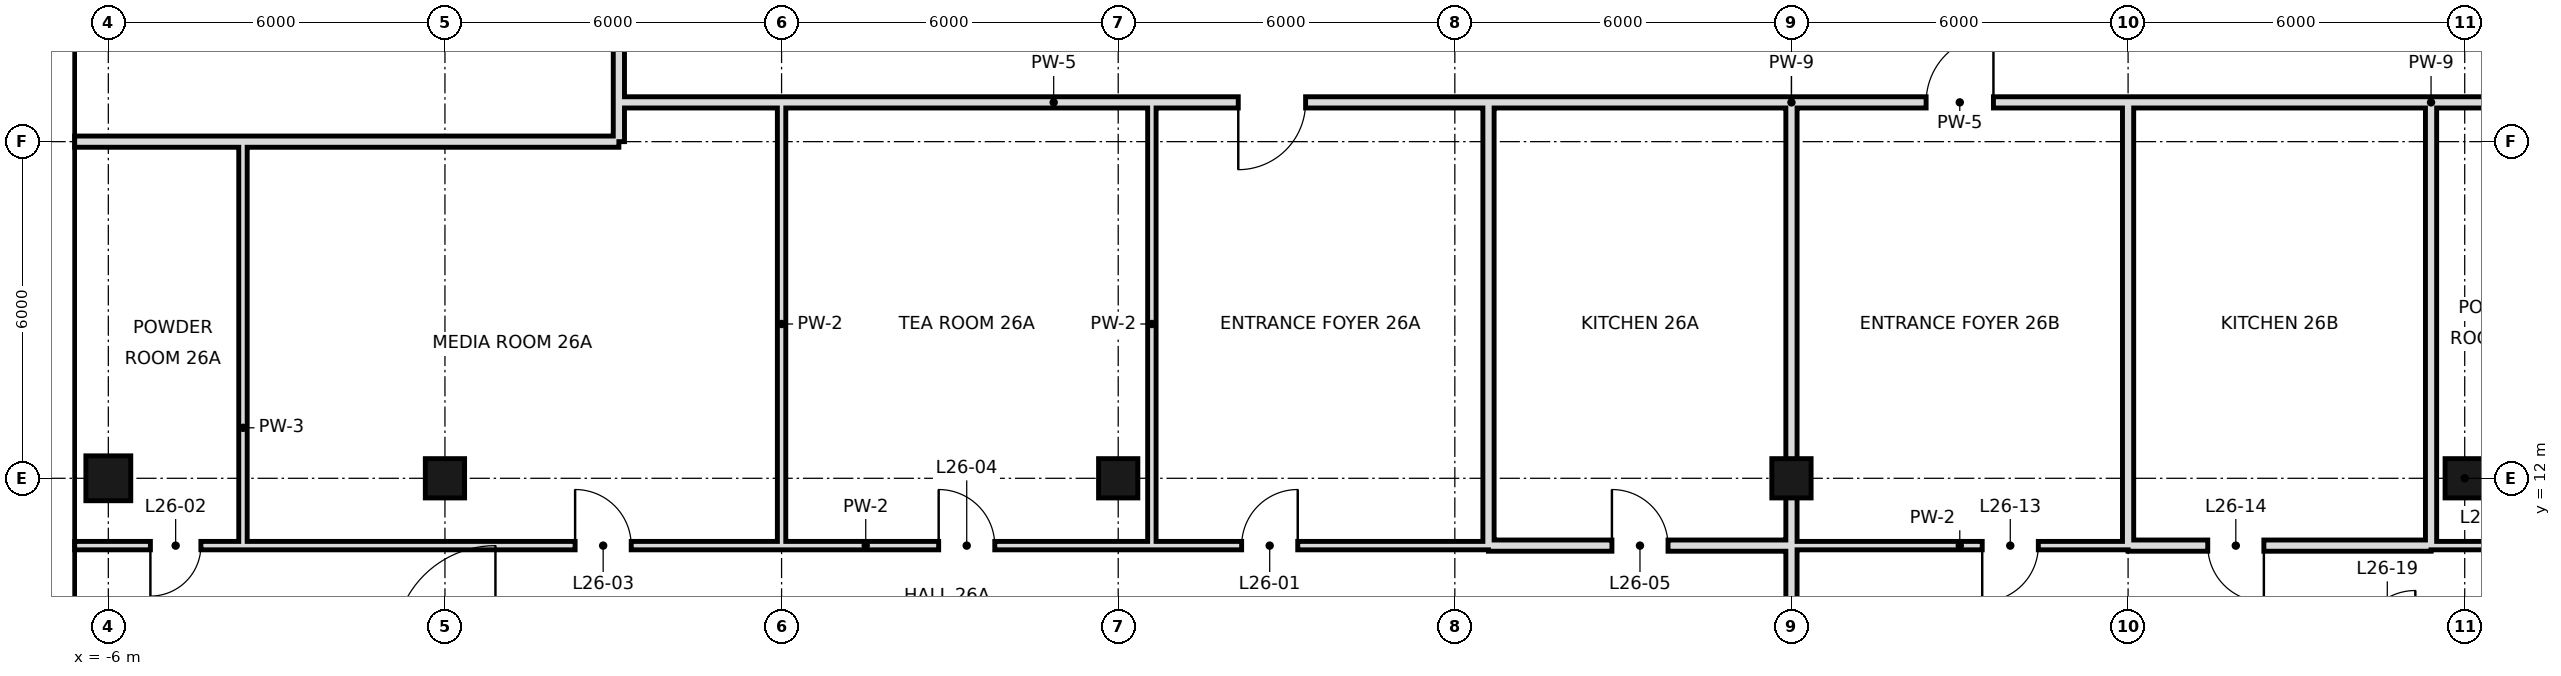
"""IFC4 building model, lengths in metres.
Left out: names, types, materials, properties, quantities, classifications, styles, units other than length and angle.
Written with IfcOpenShell. Run it as: python <this file> out.ifc"""

import sys

from ifc_helpers import new_model, si_unit, direction, frame, frame_2d, origin, origin_2d, place, context, subcontext, project, spatial, rectangle, hollow_rectangle, extrude, element, fill, save


model = new_model("IFC4")
c1 = context("Model", 3, precision=1e-05, world=origin(), true_north=direction((0.0, 1.0)))
c2 = subcontext(c1, "Body", "Model", "MODEL_VIEW")
j1 = project(units=[si_unit("LENGTHUNIT", "METRE"), si_unit("PLANEANGLEUNIT", "RADIAN")], contexts=[c1])
p1 = place(None, origin())
s1 = spatial("IfcSite", under=j1, at=p1, CompositionType="ELEMENT")
p2 = place(p1, origin())
s2 = spatial("IfcBuilding", under=s1, at=p2, CompositionType="ELEMENT")
p3 = place(p2, frame((0.0, 0.0, 119.6)))
s3 = spatial("IfcBuildingStorey", under=s2, at=p3, CompositionType="ELEMENT", Elevation=119.6)
p4 = place(p3, frame((-6.0, 12.0, 0.0), z_axis=(0.0, 0.0, 1.0), x_axis=(1.0, 0.0, 0.0)))
e1 = element("IfcColumn", 1, at=p4, inside=s3, PredefinedType="COLUMN", context=c2, shape_type="SweptSolid", body=[
    extrude(hollow_rectangle(XDim=0.8, YDim=0.8, WallThickness=0.04, at=origin_2d()), origin(), (0.0, 0.0, 1.0), 3.6),
])
for number, where, z_axis, x_axis in (
    (2, (0.0, 12.0, 0.0), (0.0, 0.0, 1.0), (1.0, 0.0, 0.0)),
    (3, (12.0, 12.0, 0.0), (0.0, 0.0, 1.0), (1.0, 0.0, 0.0)),
    (4, (24.0, 12.0, 0.0), (0.0, 0.0, 1.0), (1.0, 0.0, 0.0)),
    (5, (36.0, 12.0, 0.0), (0.0, 0.0, 1.0), (1.0, 0.0, 0.0)),
):
    element("IfcColumn", number, at=place(p3, frame(where, z_axis=z_axis, x_axis=x_axis)), inside=s3, PredefinedType="COLUMN", context=c2, shape_type="SweptSolid", body=[
        extrude(hollow_rectangle(XDim=0.7, YDim=0.7, WallThickness=0.036, at=origin_2d()), origin(), (0.0, 0.0, 1.0), 3.6),
    ])
p5 = place(p3, frame((-3.6, 10.8, 0.0), z_axis=(0.0, 0.0, 1.0), x_axis=(0.0, 1.0, 0.0)))
e6 = element("IfcWall", 6, at=p5, inside=s3, PredefinedType="PARTITIONING", context=c2, shape_type="SweptSolid", body=[
    extrude(rectangle(XDim=7.2, YDim=0.15, at=frame_2d((3.6, 0.0))), origin(), (0.0, 0.0, 1.0), 3.42),
])
p6 = place(p3, frame((12.6, 10.8, 0.0), z_axis=(0.0, 0.0, 1.0), x_axis=(0.0, 1.0, 0.0)))
e7 = element("IfcWall", 7, at=p6, inside=s3, PredefinedType="PARTITIONING", context=c2, shape_type="SweptSolid", body=[
    extrude(rectangle(XDim=7.9, YDim=0.15, at=frame_2d((3.95, 0.0))), origin(), (0.0, 0.0, 1.0), 3.42),
])
for number, where, z_axis, x_axis in (
    (8, (18.6, 10.8, 0.0), (0.0, 0.0, 1.0), (0.0, 1.0, 0.0)),
    (9, (24.0, 10.8, 0.0), (0.0, 0.0, 1.0), (0.0, 1.0, 0.0)),
):
    element("IfcWall", number, at=place(p3, frame(where, z_axis=z_axis, x_axis=x_axis)), inside=s3, PredefinedType="SOLIDWALL", context=c2, shape_type="SweptSolid", body=[
        extrude(rectangle(XDim=7.9, YDim=0.2, at=frame_2d((3.95, 0.0))), origin(), (0.0, 0.0, 1.0), 2.72),
    ])
p7 = place(p3, frame((24.0, 0.0, 0.0), z_axis=(0.0, 0.0, 1.0), x_axis=(0.0, 1.0, 0.0)))
e10 = element("IfcWall", 10, at=p7, inside=s3, PredefinedType="SOLIDWALL", context=c2, shape_type="SweptSolid", body=[
    extrude(rectangle(XDim=10.8, YDim=0.2, at=frame_2d((5.4, 0.0))), origin(), (0.0, 0.0, 1.0), 2.72),
])
p8 = place(p3, frame((3.1, 18.0, 0.0), z_axis=(0.0, 0.0, 1.0), x_axis=(0.0, 1.0, 0.0)))
e11 = element("IfcWall", 11, at=p8, inside=s3, PredefinedType="SOLIDWALL", context=c2, shape_type="SweptSolid", body=[
    extrude(rectangle(XDim=30.6, YDim=0.2, at=frame_2d((15.3, 0.0))), origin(), (0.0, 0.0, 1.0), 2.72),
])
p9 = place(p8, frame((14.75, 0.0, 0.0)))
e12 = element("IfcOpeningElement", 12, at=p9, cuts=e11, PredefinedType="OPENING", context=c2, shape_type="SweptSolid", body=[
    extrude(rectangle(XDim=1.2, YDim=2.4, at=frame_2d((0.6, 1.2))), frame((0.0, 0.11, 0.0), z_axis=(0.0, -1.0, 0.0), x_axis=(1.0, 0.0, 0.0)), (0.0, 0.0, 1.0), 0.22),
])
for number, where, z_axis, x_axis in (
    (13, (30.0, 10.8, 0.0), (0.0, 0.0, 1.0), (0.0, 1.0, 0.0)),
    (14, (35.4, 10.8, 0.0), (0.0, 0.0, 1.0), (0.0, 1.0, 0.0)),
):
    element("IfcWall", number, at=place(p3, frame(where, z_axis=z_axis, x_axis=x_axis)), inside=s3, PredefinedType="SOLIDWALL", context=c2, shape_type="SweptSolid", body=[
        extrude(rectangle(XDim=7.9, YDim=0.2, at=frame_2d((3.95, 0.0))), origin(), (0.0, 0.0, 1.0), 2.72),
    ])
p10 = place(p3, frame((6.0, 10.8, 0.0), z_axis=(0.0, 0.0, 1.0), x_axis=(0.0, 1.0, 0.0)))
e15 = element("IfcWall", 15, at=p10, inside=s3, PredefinedType="PARTITIONING", context=c2, shape_type="SweptSolid", body=[
    extrude(rectangle(XDim=7.9, YDim=0.15, at=frame_2d((3.95, 0.0))), origin(), (0.0, 0.0, 1.0), 2.72),
])
p11 = place(p3, frame((18.6, 10.8, 0.0), z_axis=(0.0, 0.0, 1.0), x_axis=(1.0, 0.0, 0.0)))
e16 = element("IfcWall", 16, at=p11, inside=s3, PredefinedType="SOLIDWALL", context=c2, shape_type="SweptSolid", body=[
    extrude(rectangle(XDim=5.4, YDim=0.2, at=frame_2d((2.7, 0.0))), origin(), (0.0, 0.0, 1.0), 2.72),
])
p12 = place(p11, frame((2.2, 0.0, 0.0)))
e17 = element("IfcOpeningElement", 17, at=p12, cuts=e16, PredefinedType="OPENING", context=c2, shape_type="SweptSolid", body=[
    extrude(rectangle(XDim=1.0, YDim=2.4, at=frame_2d((0.5, 1.2))), frame((0.0, 0.11, 0.0), z_axis=(0.0, -1.0, 0.0), x_axis=(1.0, 0.0, 0.0)), (0.0, 0.0, 1.0), 0.22),
])
p13 = place(p3, frame((30.0, 10.8, 0.0), z_axis=(0.0, 0.0, 1.0), x_axis=(1.0, 0.0, 0.0)))
e18 = element("IfcWall", 18, at=p13, inside=s3, PredefinedType="SOLIDWALL", context=c2, shape_type="SweptSolid", body=[
    extrude(rectangle(XDim=5.4, YDim=0.2, at=frame_2d((2.7, 0.0))), origin(), (0.0, 0.0, 1.0), 2.72),
])
p14 = place(p13, frame((1.42, 0.0, 0.0)))
e19 = element("IfcOpeningElement", 19, at=p14, cuts=e18, PredefinedType="OPENING", context=c2, shape_type="SweptSolid", body=[
    extrude(rectangle(XDim=1.0, YDim=2.4, at=frame_2d((0.5, 1.2))), frame((0.0, 0.11, 0.0), z_axis=(0.0, -1.0, 0.0), x_axis=(1.0, 0.0, 0.0)), (0.0, 0.0, 1.0), 0.22),
])
p15 = place(p3, frame((-3.6, 10.8, 0.0), z_axis=(0.0, 0.0, 1.0), x_axis=(1.0, 0.0, 0.0)))
e20 = element("IfcWall", 20, at=p15, inside=s3, PredefinedType="PARTITIONING", context=c2, shape_type="SweptSolid", body=[
    extrude(rectangle(XDim=22.2, YDim=0.15, at=frame_2d((11.1, 0.0))), origin(), (0.0, 0.0, 1.0), 3.42),
])
p16 = place(p15, frame((17.8, 0.0, 0.0)))
e21 = element("IfcOpeningElement", 21, at=p16, cuts=e20, PredefinedType="OPENING", context=c2, shape_type="SweptSolid", body=[
    extrude(rectangle(XDim=1.0, YDim=2.4, at=frame_2d((0.5, 1.2))), frame((0.0, 0.085, 0.0), z_axis=(0.0, -1.0, 0.0), x_axis=(1.0, 0.0, 0.0)), (0.0, 0.0, 1.0), 0.17),
])
p17 = place(p15, frame((5.92, 0.0, 0.0)))
e22 = element("IfcOpeningElement", 22, at=p17, cuts=e20, PredefinedType="OPENING", context=c2, shape_type="SweptSolid", body=[
    extrude(rectangle(XDim=1.0, YDim=2.4, at=frame_2d((0.5, 1.2))), frame((0.0, 0.085, 0.0), z_axis=(0.0, -1.0, 0.0), x_axis=(1.0, 0.0, 0.0)), (0.0, 0.0, 1.0), 0.17),
])
p18 = place(p15, frame((12.4, 0.0, 0.0)))
e23 = element("IfcOpeningElement", 23, at=p18, cuts=e20, PredefinedType="OPENING", context=c2, shape_type="SweptSolid", body=[
    extrude(rectangle(XDim=1.0, YDim=2.4, at=frame_2d((0.5, 1.2))), frame((0.0, 0.085, 0.0), z_axis=(0.0, -1.0, 0.0), x_axis=(1.0, 0.0, 0.0)), (0.0, 0.0, 1.0), 0.17),
])
p19 = place(p3, frame((24.0, 10.8, 0.0), z_axis=(0.0, 0.0, 1.0), x_axis=(1.0, 0.0, 0.0)))
e24 = element("IfcWall", 24, at=p19, inside=s3, PredefinedType="PARTITIONING", context=c2, shape_type="SweptSolid", body=[
    extrude(rectangle(XDim=6.0, YDim=0.15, at=frame_2d((3.0, 0.0))), origin(), (0.0, 0.0, 1.0), 3.42),
])
p20 = place(p19, frame((3.4, 0.0, 0.0)))
e25 = element("IfcOpeningElement", 25, at=p20, cuts=e24, PredefinedType="OPENING", context=c2, shape_type="SweptSolid", body=[
    extrude(rectangle(XDim=1.0, YDim=2.4, at=frame_2d((0.5, 1.2))), frame((0.0, 0.085, 0.0), z_axis=(0.0, -1.0, 0.0), x_axis=(1.0, 0.0, 0.0)), (0.0, 0.0, 1.0), 0.17),
])
p21 = place(p3, frame((-6.6, 10.8, 0.0), z_axis=(0.0, 0.0, 1.0), x_axis=(1.0, 0.0, 0.0)))
e26 = element("IfcWall", 26, at=p21, inside=s3, PredefinedType="PARTITIONING", context=c2, shape_type="SweptSolid", body=[
    extrude(rectangle(XDim=3.0, YDim=0.15, at=frame_2d((1.5, 0.0))), origin(), (0.0, 0.0, 1.0), 3.42),
])
p22 = place(p21, frame((1.35, 0.0, 0.0)))
e27 = element("IfcOpeningElement", 27, at=p22, cuts=e26, PredefinedType="OPENING", context=c2, shape_type="SweptSolid", body=[
    extrude(rectangle(XDim=0.9, YDim=2.4, at=frame_2d((0.45, 1.2))), frame((0.0, 0.085, 0.0), z_axis=(0.0, -1.0, 0.0), x_axis=(1.0, 0.0, 0.0)), (0.0, 0.0, 1.0), 0.17),
])
p23 = place(p3, frame((35.4, 10.8, 0.0), z_axis=(0.0, 0.0, 1.0), x_axis=(1.0, 0.0, 0.0)))
e28 = element("IfcWall", 28, at=p23, inside=s3, PredefinedType="PARTITIONING", context=c2, shape_type="SweptSolid", body=[
    extrude(rectangle(XDim=2.4, YDim=0.15, at=frame_2d((1.2, 0.0))), origin(), (0.0, 0.0, 1.0), 3.42),
])
p24 = place(p23, frame((1.1, 0.0, 0.0)))
e29 = element("IfcOpeningElement", 29, at=p24, cuts=e28, PredefinedType="OPENING", context=c2, shape_type="SweptSolid", body=[
    extrude(rectangle(XDim=0.9, YDim=2.4, at=frame_2d((0.45, 1.2))), frame((0.0, 0.085, 0.0), z_axis=(0.0, -1.0, 0.0), x_axis=(1.0, 0.0, 0.0)), (0.0, 0.0, 1.0), 0.17),
])
p25 = place(p3, frame((-6.6, 18.0, 0.0), z_axis=(0.0, 0.0, 1.0), x_axis=(1.0, 0.0, 0.0)))
e30 = element("IfcWall", 30, at=p25, inside=s3, PredefinedType="SOLIDWALL", context=c2, shape_type="SweptSolid", body=[
    extrude(rectangle(XDim=9.7, YDim=0.2, at=frame_2d((4.85, 0.0))), origin(), (0.0, 0.0, 1.0), 2.72),
])
p26 = place(p3, frame((3.1, 18.7, 0.0), z_axis=(0.0, 0.0, 1.0), x_axis=(1.0, 0.0, 0.0)))
e31 = element("IfcWall", 31, at=p26, inside=s3, PredefinedType="SOLIDWALL", context=c2, shape_type="SweptSolid", body=[
    extrude(rectangle(XDim=15.5, YDim=0.2, at=frame_2d((7.75, 0.0))), origin(), (0.0, 0.0, 1.0), 2.72),
])
p27 = place(p26, frame((11.04, 0.0, 0.0)))
e32 = element("IfcOpeningElement", 32, at=p27, cuts=e31, PredefinedType="OPENING", context=c2, shape_type="SweptSolid", body=[
    extrude(rectangle(XDim=1.2, YDim=2.4, at=frame_2d((0.6, 1.2))), frame((0.0, 0.11, 0.0), z_axis=(0.0, -1.0, 0.0), x_axis=(1.0, 0.0, 0.0)), (0.0, 0.0, 1.0), 0.22),
])
p28 = place(p3, frame((24.0, 18.7, 0.0), z_axis=(0.0, 0.0, 1.0), x_axis=(1.0, 0.0, 0.0)))
e33 = element("IfcWall", 33, at=p28, inside=s3, PredefinedType="SOLIDWALL", context=c2, shape_type="SweptSolid", body=[
    extrude(rectangle(XDim=6.0, YDim=0.2, at=frame_2d((3.0, 0.0))), origin(), (0.0, 0.0, 1.0), 2.72),
])
p29 = place(p28, frame((2.4, 0.0, 0.0)))
e34 = element("IfcOpeningElement", 34, at=p29, cuts=e33, PredefinedType="OPENING", context=c2, shape_type="SweptSolid", body=[
    extrude(rectangle(XDim=1.2, YDim=2.4, at=frame_2d((0.6, 1.2))), frame((0.0, 0.11, 0.0), z_axis=(0.0, -1.0, 0.0), x_axis=(1.0, 0.0, 0.0)), (0.0, 0.0, 1.0), 0.22),
])
p30 = place(p3, frame((35.4, 18.7, 0.0), z_axis=(0.0, 0.0, 1.0), x_axis=(1.0, 0.0, 0.0)))
e35 = element("IfcWall", 35, at=p30, inside=s3, PredefinedType="SOLIDWALL", context=c2, shape_type="SweptSolid", body=[
    extrude(rectangle(XDim=9.5, YDim=0.2, at=frame_2d((4.75, 0.0))), origin(), (0.0, 0.0, 1.0), 2.72),
])
p31 = place(p3, frame((18.6, 18.7, 0.0), z_axis=(0.0, 0.0, 1.0), x_axis=(1.0, 0.0, 0.0)))
e36 = element("IfcWall", 36, at=p31, inside=s3, PredefinedType="SOLIDWALL", context=c2, shape_type="SweptSolid", body=[
    extrude(rectangle(XDim=5.4, YDim=0.2, at=frame_2d((2.7, 0.0))), origin(), (0.0, 0.0, 1.0), 3.42),
])
p32 = place(p3, frame((30.0, 18.7, 0.0), z_axis=(0.0, 0.0, 1.0), x_axis=(1.0, 0.0, 0.0)))
e37 = element("IfcWall", 37, at=p32, inside=s3, PredefinedType="SOLIDWALL", context=c2, shape_type="SweptSolid", body=[
    extrude(rectangle(XDim=5.4, YDim=0.2, at=frame_2d((2.7, 0.0))), origin(), (0.0, 0.0, 1.0), 2.72),
])
p33 = place(p16, frame((1.0, 0.0, 0.0), z_axis=(0.0, 0.0, 1.0), x_axis=(-1.0, 0.0, 0.0)))
e38 = element("IfcDoor", 38, at=p33, inside=s3, OperationType="SINGLE_SWING_LEFT", PredefinedType="DOOR", context=c2, shape_type="SweptSolid", body=[
    extrude(rectangle(XDim=1.0, YDim=2.4, at=frame_2d((0.5, 1.2))), frame((0.0, 0.025, 0.0), z_axis=(0.0, -1.0, 0.0), x_axis=(1.0, 0.0, 0.0)), (0.0, 0.0, 1.0), 0.05),
])
fill(e21, e38)
p34 = place(p22, frame((0.9, 0.0, 0.0), z_axis=(0.0, 0.0, 1.0), x_axis=(-1.0, 0.0, 0.0)))
e39 = element("IfcDoor", 39, at=p34, inside=s3, OperationType="SINGLE_SWING_RIGHT", PredefinedType="DOOR", context=c2, shape_type="SweptSolid", body=[
    extrude(rectangle(XDim=0.9, YDim=2.4, at=frame_2d((0.45, 1.2))), frame((0.0, 0.025, 0.0), z_axis=(0.0, -1.0, 0.0), x_axis=(1.0, 0.0, 0.0)), (0.0, 0.0, 1.0), 0.05),
])
fill(e27, e39)
p35 = place(p17, origin())
e40 = element("IfcDoor", 40, at=p35, inside=s3, OperationType="SINGLE_SWING_LEFT", PredefinedType="DOOR", context=c2, shape_type="SweptSolid", body=[
    extrude(rectangle(XDim=1.0, YDim=2.4, at=frame_2d((0.5, 1.2))), frame((0.0, 0.025, 0.0), z_axis=(0.0, -1.0, 0.0), x_axis=(1.0, 0.0, 0.0)), (0.0, 0.0, 1.0), 0.05),
])
fill(e22, e40)
p36 = place(p18, origin())
e41 = element("IfcDoor", 41, at=p36, inside=s3, OperationType="SINGLE_SWING_LEFT", PredefinedType="DOOR", context=c2, shape_type="SweptSolid", body=[
    extrude(rectangle(XDim=1.0, YDim=2.4, at=frame_2d((0.5, 1.2))), frame((0.0, 0.025, 0.0), z_axis=(0.0, -1.0, 0.0), x_axis=(1.0, 0.0, 0.0)), (0.0, 0.0, 1.0), 0.05),
])
fill(e23, e41)
p37 = place(p12, origin())
e42 = element("IfcDoor", 42, at=p37, inside=s3, OperationType="SINGLE_SWING_LEFT", PredefinedType="DOOR", context=c2, shape_type="SweptSolid", body=[
    extrude(rectangle(XDim=1.0, YDim=2.4, at=frame_2d((0.5, 1.2))), frame((0.0, 0.025, 0.0), z_axis=(0.0, -1.0, 0.0), x_axis=(1.0, 0.0, 0.0)), (0.0, 0.0, 1.0), 0.05),
])
fill(e17, e42)
p38 = place(p20, frame((1.0, 0.0, 0.0), z_axis=(0.0, 0.0, 1.0), x_axis=(-1.0, 0.0, 0.0)))
e43 = element("IfcDoor", 43, at=p38, inside=s3, OperationType="SINGLE_SWING_RIGHT", PredefinedType="DOOR", context=c2, shape_type="SweptSolid", body=[
    extrude(rectangle(XDim=1.0, YDim=2.4, at=frame_2d((0.5, 1.2))), frame((0.0, 0.025, 0.0), z_axis=(0.0, -1.0, 0.0), x_axis=(1.0, 0.0, 0.0)), (0.0, 0.0, 1.0), 0.05),
])
fill(e25, e43)
p39 = place(p14, origin())
e44 = element("IfcDoor", 44, at=p39, inside=s3, OperationType="SINGLE_SWING_RIGHT", PredefinedType="DOOR", context=c2, shape_type="SweptSolid", body=[
    extrude(rectangle(XDim=1.0, YDim=2.4, at=frame_2d((0.5, 1.2))), frame((0.0, 0.025, 0.0), z_axis=(0.0, -1.0, 0.0), x_axis=(1.0, 0.0, 0.0)), (0.0, 0.0, 1.0), 0.05),
])
fill(e19, e44)
p40 = place(p27, frame((1.2, 0.0, 0.0), z_axis=(0.0, 0.0, 1.0), x_axis=(-1.0, 0.0, 0.0)))
e45 = element("IfcDoor", 45, at=p40, inside=s3, OperationType="SINGLE_SWING_RIGHT", PredefinedType="DOOR", context=c2, shape_type="SweptSolid", body=[
    extrude(rectangle(XDim=1.2, YDim=2.4, at=frame_2d((0.6, 1.2))), frame((0.0, 0.025, 0.0), z_axis=(0.0, -1.0, 0.0), x_axis=(1.0, 0.0, 0.0)), (0.0, 0.0, 1.0), 0.05),
])
fill(e32, e45)
p41 = place(p29, frame((1.2, 0.0, 0.0), z_axis=(0.0, 0.0, 1.0), x_axis=(-1.0, 0.0, 0.0)))
e46 = element("IfcDoor", 46, at=p41, inside=s3, OperationType="SINGLE_SWING_LEFT", PredefinedType="DOOR", context=c2, shape_type="SweptSolid", body=[
    extrude(rectangle(XDim=1.2, YDim=2.4, at=frame_2d((0.6, 1.2))), frame((0.0, 0.025, 0.0), z_axis=(0.0, -1.0, 0.0), x_axis=(1.0, 0.0, 0.0)), (0.0, 0.0, 1.0), 0.05),
])
fill(e34, e46)
save(model, sys.argv[1])
